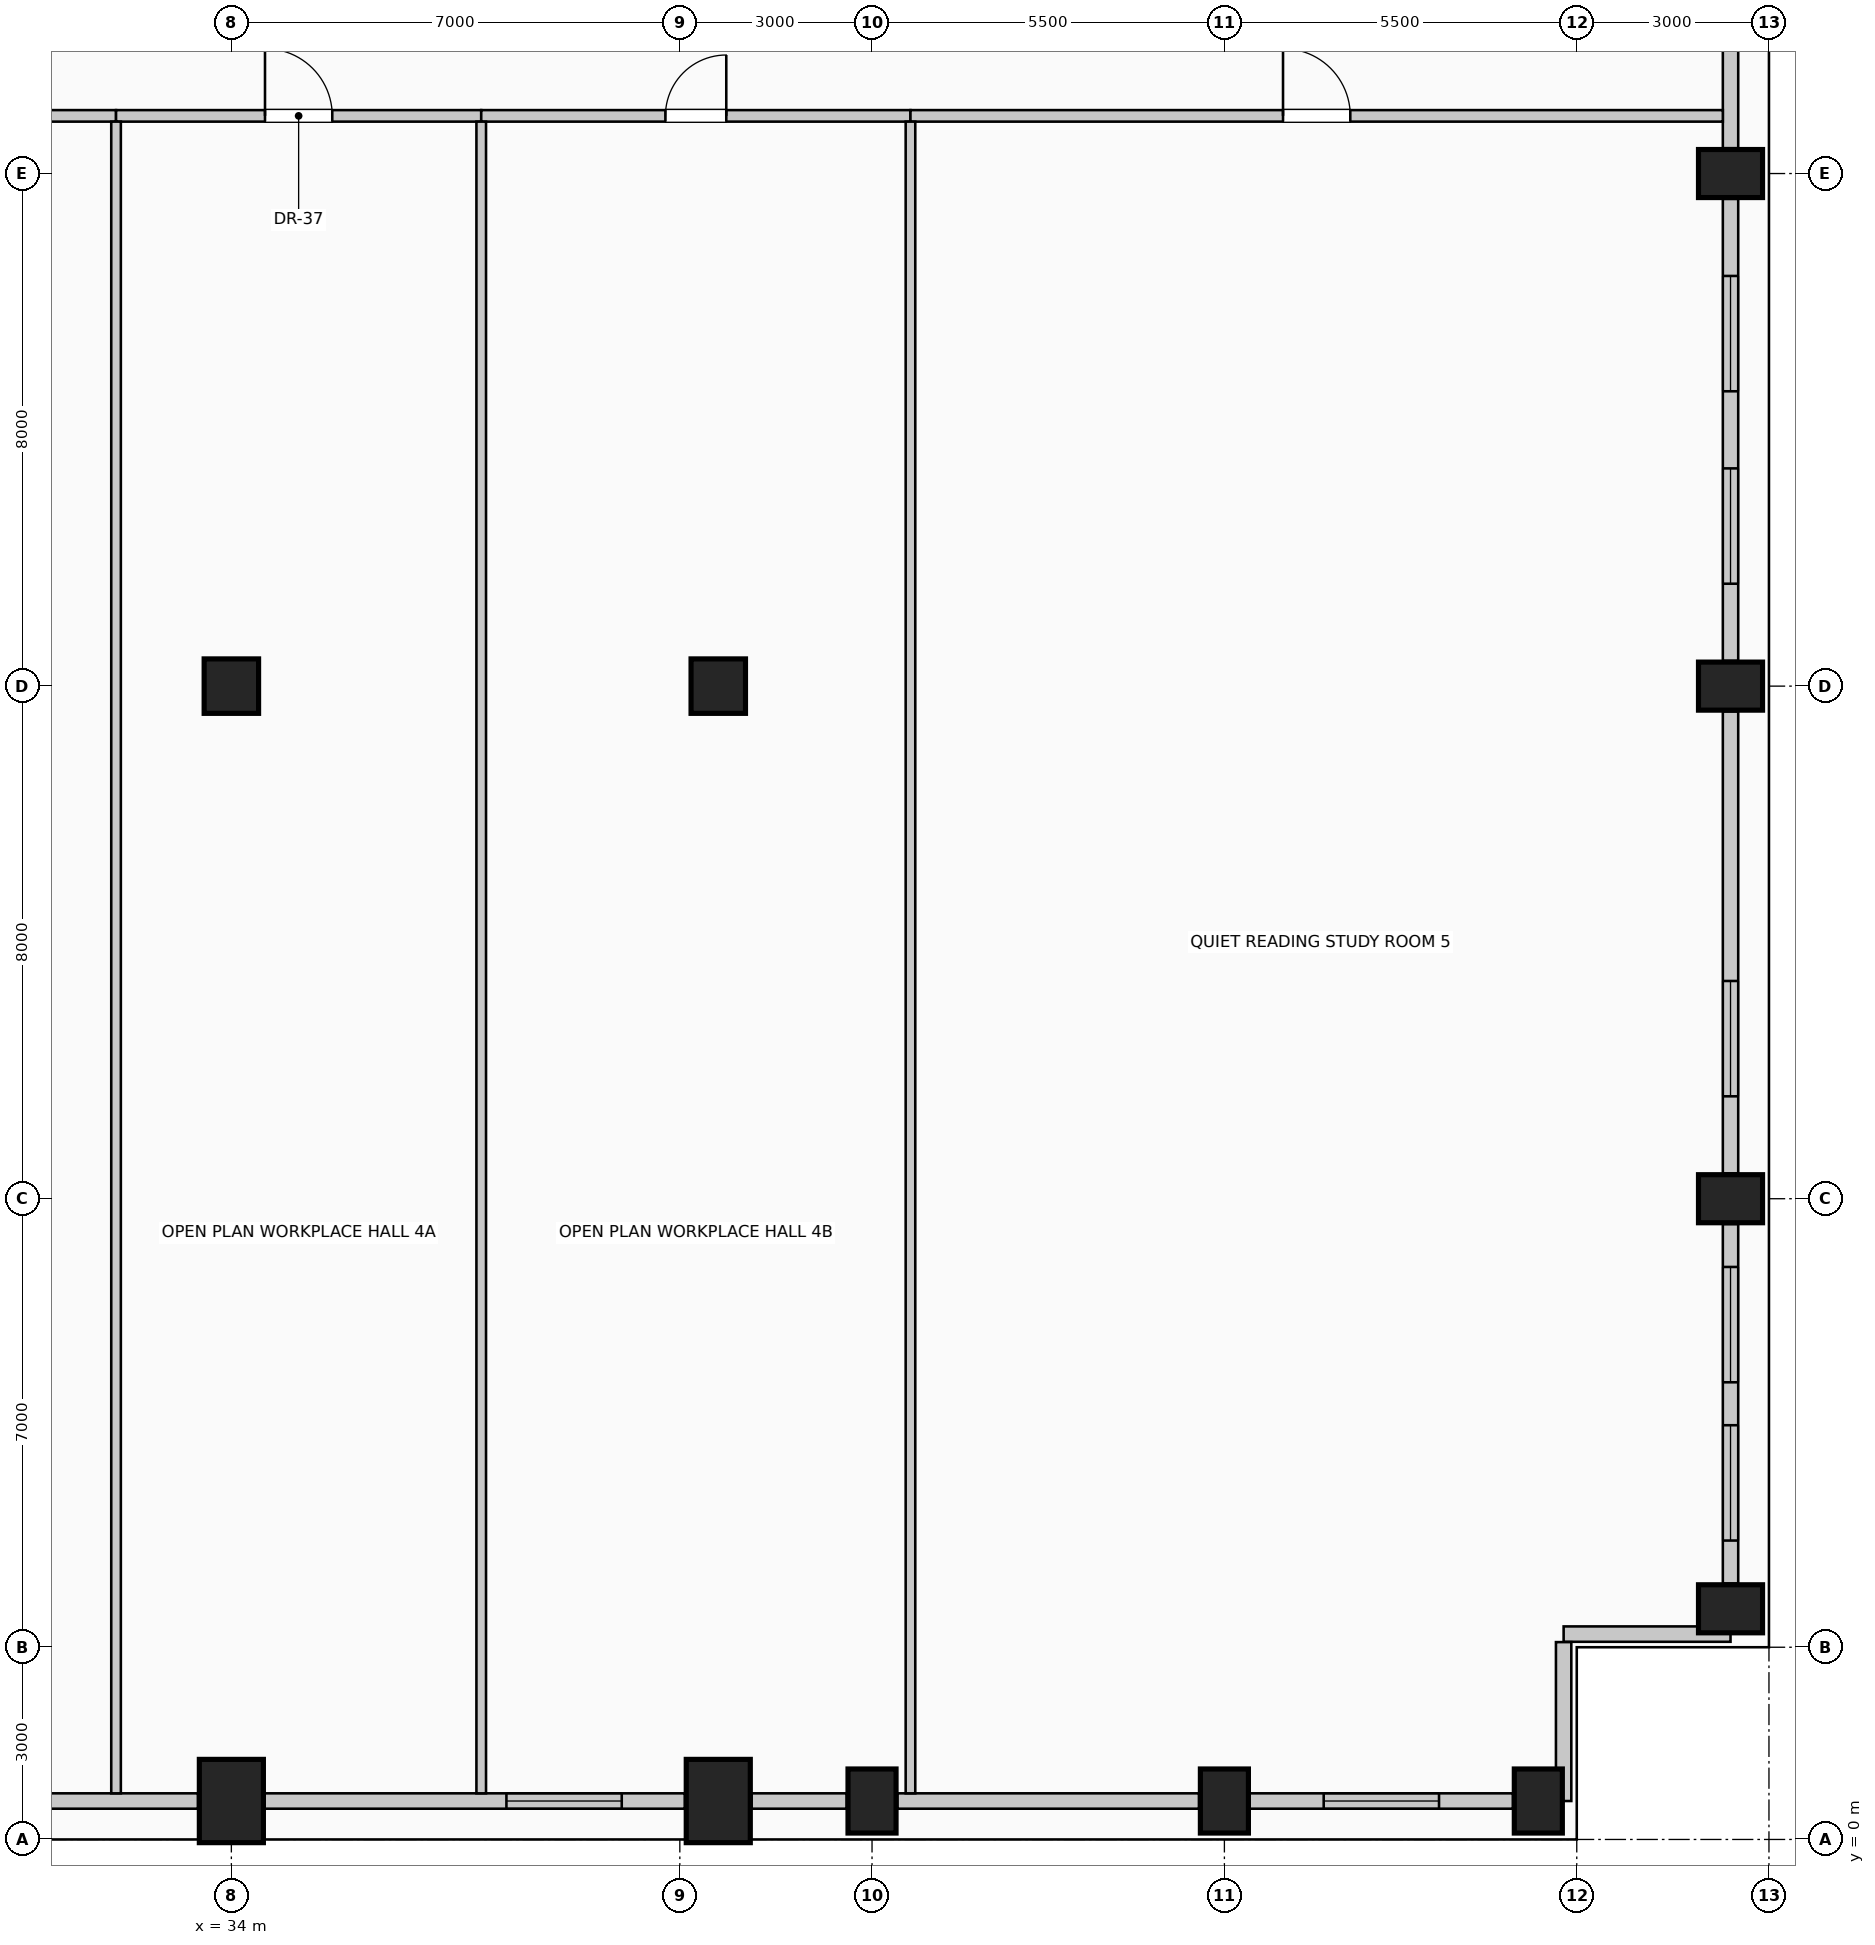
"""IFC4 building model, lengths in metres.
Left out: names, types, materials, properties, quantities, classifications, styles, units other than length and angle.
Written with IfcOpenShell. Run it as: python <this file> out.ifc"""

import sys

from ifc_helpers import new_model, si_unit, direction, frame, frame_2d, origin, origin_2d, place, context, subcontext, project, spatial, rectangle, circle, extrude, element, fill, save


model = new_model("IFC4")
c1 = context("Model", 3, precision=1e-05, world=origin(), true_north=direction((0.0, 1.0)))
c2 = subcontext(c1, "Body", "Model", "MODEL_VIEW")
j1 = project(units=[si_unit("LENGTHUNIT", "METRE"), si_unit("PLANEANGLEUNIT", "RADIAN")], contexts=[c1])
p1 = place(None, origin())
s1 = spatial("IfcSite", under=j1, at=p1, CompositionType="ELEMENT")
p2 = place(p1, origin())
s2 = spatial("IfcBuilding", under=s1, at=p2, CompositionType="ELEMENT")
p3 = place(p2, frame((0.0, 0.0, 222.6)))
s3 = spatial("IfcBuildingStorey", under=s2, at=p3, CompositionType="ELEMENT", Elevation=222.6)
for number, where, z_axis, x_axis in (
    (1, (34.0, 0.6, 0.0), (0.0, 0.0, 1.0), (1.0, 0.0, 0.0)),
    (2, (41.6, 0.6, 0.0), (0.0, 0.0, 1.0), (1.0, 0.0, 0.0)),
):
    element("IfcColumn", number, at=place(p3, frame(where, z_axis=z_axis, x_axis=x_axis)), inside=s3, PredefinedType="COLUMN", context=c2, shape_type="SweptSolid", body=[
        extrude(rectangle(XDim=1.0, YDim=1.3, at=origin_2d()), origin(), (0.0, 0.0, 1.0), 4.0),
    ])
for number, where, z_axis, x_axis in (
    (3, (44.0, 0.6, 0.0), (0.0, 0.0, 1.0), (1.0, 0.0, 0.0)),
    (4, (49.5, 0.6, 0.0), (0.0, 0.0, 1.0), (1.0, 0.0, 0.0)),
    (5, (54.4, 0.6, 0.0), (0.0, 0.0, 1.0), (1.0, 0.0, 0.0)),
    (6, (57.4, 3.6, 0.0), (0.0, 0.0, 1.0), (0.0, 1.0, 0.0)),
    (7, (57.4, 10.0, 0.0), (0.0, 0.0, 1.0), (0.0, 1.0, 0.0)),
    (8, (57.4, 18.0, 0.0), (0.0, 0.0, 1.0), (0.0, 1.0, 0.0)),
    (9, (57.4, 26.0, 0.0), (0.0, 0.0, 1.0), (0.0, 1.0, 0.0)),
):
    element("IfcColumn", number, at=place(p3, frame(where, z_axis=z_axis, x_axis=x_axis)), inside=s3, PredefinedType="COLUMN", context=c2, shape_type="SweptSolid", body=[
        extrude(rectangle(XDim=0.75, YDim=1.0, at=origin_2d()), origin(), (0.0, 0.0, 1.0), 4.0),
    ])
for number, where, z_axis, x_axis in (
    (10, (41.6, 18.0, 0.0), (0.0, 0.0, 1.0), (1.0, 0.0, 0.0)),
    (11, (34.0, 18.0, 0.0), (0.0, 0.0, 1.0), (1.0, 0.0, 0.0)),
):
    element("IfcColumn", number, at=place(p3, frame(where, z_axis=z_axis, x_axis=x_axis)), inside=s3, PredefinedType="COLUMN", context=c2, shape_type="SweptSolid", body=[
        extrude(circle(Radius=0.425, at=origin_2d()), origin(), (0.0, 0.0, 1.0), 4.0),
    ])
p4 = place(p3, frame((33.48, 0.6, 0.0), z_axis=(0.0, 0.0, 1.0), x_axis=(-1.0, 0.0, 0.0)))
e12 = element("IfcWall", 12, at=p4, inside=s3, PredefinedType="SOLIDWALL", context=c2, shape_type="SweptSolid", body=[
    extrude(rectangle(XDim=4.085, YDim=0.24, at=frame_2d((2.042, 0.0))), origin(), (0.0, 0.0, 1.0), 3.0),
])
p5 = place(p3, frame((41.08, 0.6, 0.0), z_axis=(0.0, 0.0, 1.0), x_axis=(-1.0, 0.0, 0.0)))
e13 = element("IfcWall", 13, at=p5, inside=s3, PredefinedType="SOLIDWALL", context=c2, shape_type="SweptSolid", body=[
    extrude(rectangle(XDim=6.56, YDim=0.24, at=frame_2d((3.28, 0.0))), origin(), (0.0, 0.0, 1.0), 3.0),
])
p6 = place(p5, frame((0.987, 0.0, 0.42)))
e14 = element("IfcOpeningElement", 14, at=p6, cuts=e13, PredefinedType="OPENING", context=c2, shape_type="SweptSolid", body=[
    extrude(rectangle(XDim=1.8, YDim=2.2, at=frame_2d((0.9, 1.1))), frame((0.0, 0.13, 0.0), z_axis=(0.0, -1.0, 0.0), x_axis=(1.0, 0.0, 0.0)), (0.0, 0.0, 1.0), 0.26),
])
p7 = place(p3, frame((43.605, 0.6, 0.0), z_axis=(0.0, 0.0, 1.0), x_axis=(-1.0, 0.0, 0.0)))
e15 = element("IfcWall", 15, at=p7, inside=s3, PredefinedType="SOLIDWALL", context=c2, shape_type="SweptSolid", body=[
    extrude(rectangle(XDim=1.485, YDim=0.24, at=frame_2d((0.742, 0.0))), origin(), (0.0, 0.0, 1.0), 3.0),
])
p8 = place(p3, frame((49.105, 0.6, 0.0), z_axis=(0.0, 0.0, 1.0), x_axis=(-1.0, 0.0, 0.0)))
e16 = element("IfcWall", 16, at=p8, inside=s3, PredefinedType="SOLIDWALL", context=c2, shape_type="SweptSolid", body=[
    extrude(rectangle(XDim=4.71, YDim=0.24, at=frame_2d((2.355, 0.0))), origin(), (0.0, 0.0, 1.0), 3.0),
])
p9 = place(p3, frame((54.005, 0.6, 0.0), z_axis=(0.0, 0.0, 1.0), x_axis=(-1.0, 0.0, 0.0)))
e17 = element("IfcWall", 17, at=p9, inside=s3, PredefinedType="SOLIDWALL", context=c2, shape_type="SweptSolid", body=[
    extrude(rectangle(XDim=4.11, YDim=0.24, at=frame_2d((2.055, 0.0))), origin(), (0.0, 0.0, 1.0), 3.0),
])
p10 = place(p9, frame((1.155, 0.0, 0.42)))
e18 = element("IfcOpeningElement", 18, at=p10, cuts=e17, PredefinedType="OPENING", context=c2, shape_type="SweptSolid", body=[
    extrude(rectangle(XDim=1.8, YDim=2.2, at=frame_2d((0.9, 1.1))), frame((0.0, 0.13, 0.0), z_axis=(0.0, -1.0, 0.0), x_axis=(1.0, 0.0, 0.0)), (0.0, 0.0, 1.0), 0.26),
])
p11 = place(p3, frame((57.4, 9.605, 0.0), z_axis=(0.0, 0.0, 1.0), x_axis=(0.0, -1.0, 0.0)))
e19 = element("IfcWall", 19, at=p11, inside=s3, PredefinedType="SOLIDWALL", context=c2, shape_type="SweptSolid", body=[
    extrude(rectangle(XDim=5.61, YDim=0.24, at=frame_2d((2.805, 0.0))), origin(), (0.0, 0.0, 1.0), 3.0),
])
p12 = place(p11, frame((0.67, 0.0, 0.42)))
e20 = element("IfcOpeningElement", 20, at=p12, cuts=e19, PredefinedType="OPENING", context=c2, shape_type="SweptSolid", body=[
    extrude(rectangle(XDim=1.8, YDim=2.2, at=frame_2d((0.9, 1.1))), frame((0.0, 0.13, 0.0), z_axis=(0.0, -1.0, 0.0), x_axis=(1.0, 0.0, 0.0)), (0.0, 0.0, 1.0), 0.26),
])
p13 = place(p11, frame((3.14, 0.0, 0.42)))
e21 = element("IfcOpeningElement", 21, at=p13, cuts=e19, PredefinedType="OPENING", context=c2, shape_type="SweptSolid", body=[
    extrude(rectangle(XDim=1.8, YDim=2.2, at=frame_2d((0.9, 1.1))), frame((0.0, 0.13, 0.0), z_axis=(0.0, -1.0, 0.0), x_axis=(1.0, 0.0, 0.0)), (0.0, 0.0, 1.0), 0.26),
])
p14 = place(p3, frame((57.4, 17.605, 0.0), z_axis=(0.0, 0.0, 1.0), x_axis=(0.0, -1.0, 0.0)))
e22 = element("IfcWall", 22, at=p14, inside=s3, PredefinedType="SOLIDWALL", context=c2, shape_type="SweptSolid", body=[
    extrude(rectangle(XDim=7.21, YDim=0.24, at=frame_2d((3.605, 0.0))), origin(), (0.0, 0.0, 1.0), 3.0),
])
p15 = place(p14, frame((4.207, 0.0, 0.42)))
e23 = element("IfcOpeningElement", 23, at=p15, cuts=e22, PredefinedType="OPENING", context=c2, shape_type="SweptSolid", body=[
    extrude(rectangle(XDim=1.8, YDim=2.2, at=frame_2d((0.9, 1.1))), frame((0.0, 0.13, 0.0), z_axis=(0.0, -1.0, 0.0), x_axis=(1.0, 0.0, 0.0)), (0.0, 0.0, 1.0), 0.26),
])
p16 = place(p3, frame((57.4, 25.605, 0.0), z_axis=(0.0, 0.0, 1.0), x_axis=(0.0, -1.0, 0.0)))
e24 = element("IfcWall", 24, at=p16, inside=s3, PredefinedType="SOLIDWALL", context=c2, shape_type="SweptSolid", body=[
    extrude(rectangle(XDim=7.21, YDim=0.24, at=frame_2d((3.605, 0.0))), origin(), (0.0, 0.0, 1.0), 3.0),
])
p17 = place(p16, frame((1.203, 0.0, 0.42)))
e25 = element("IfcOpeningElement", 25, at=p17, cuts=e24, PredefinedType="OPENING", context=c2, shape_type="SweptSolid", body=[
    extrude(rectangle(XDim=1.8, YDim=2.2, at=frame_2d((0.9, 1.1))), frame((0.0, 0.13, 0.0), z_axis=(0.0, -1.0, 0.0), x_axis=(1.0, 0.0, 0.0)), (0.0, 0.0, 1.0), 0.26),
])
p18 = place(p16, frame((4.207, 0.0, 0.42)))
e26 = element("IfcOpeningElement", 26, at=p18, cuts=e24, PredefinedType="OPENING", context=c2, shape_type="SweptSolid", body=[
    extrude(rectangle(XDim=1.8, YDim=2.2, at=frame_2d((0.9, 1.1))), frame((0.0, 0.13, 0.0), z_axis=(0.0, -1.0, 0.0), x_axis=(1.0, 0.0, 0.0)), (0.0, 0.0, 1.0), 0.26),
])
p19 = place(p3, frame((57.4, 33.605, 0.0), z_axis=(0.0, 0.0, 1.0), x_axis=(0.0, -1.0, 0.0)))
e27 = element("IfcWall", 27, at=p19, inside=s3, PredefinedType="SOLIDWALL", context=c2, shape_type="SweptSolid", body=[
    extrude(rectangle(XDim=7.21, YDim=0.24, at=frame_2d((3.605, 0.0))), origin(), (0.0, 0.0, 1.0), 3.0),
])
p20 = place(p3, frame((57.4, 3.205, 0.0), z_axis=(0.0, 0.0, 1.0), x_axis=(-1.0, 0.0, 0.0)))
e28 = element("IfcWall", 28, at=p20, inside=s3, PredefinedType="SOLIDWALL", context=c2, shape_type="SweptSolid", body=[
    extrude(rectangle(XDim=2.605, YDim=0.24, at=frame_2d((1.302, 0.0))), origin(), (0.0, 0.0, 1.0), 3.75),
])
p21 = place(p3, frame((54.795, 3.08, 0.0), z_axis=(0.0, 0.0, 1.0), x_axis=(0.0, -1.0, 0.0)))
e29 = element("IfcWall", 29, at=p21, inside=s3, PredefinedType="SOLIDWALL", context=c2, shape_type="SweptSolid", body=[
    extrude(rectangle(XDim=2.48, YDim=0.24, at=frame_2d((1.24, 0.0))), origin(), (0.0, 0.0, 1.0), 3.75),
])
p22 = place(p3, frame((23.1, 26.9, 0.0), z_axis=(0.0, 0.0, 1.0), x_axis=(1.0, 0.0, 0.0)))
e30 = element("IfcWall", 30, at=p22, inside=s3, PredefinedType="PARTITIONING", context=c2, shape_type="SweptSolid", body=[
    extrude(rectangle(XDim=9.1, YDim=0.18, at=frame_2d((4.55, 0.0))), origin(), (0.0, 0.0, 1.0), 3.75),
])
p23 = place(p22, frame((4.075, 0.0, 0.0)))
e31 = element("IfcOpeningElement", 31, at=p23, cuts=e30, PredefinedType="OPENING", context=c2, shape_type="SweptSolid", body=[
    extrude(rectangle(XDim=0.95, YDim=2.15, at=frame_2d((0.475, 1.075))), frame((0.0, 0.1, 0.0), z_axis=(0.0, -1.0, 0.0), x_axis=(1.0, 0.0, 0.0)), (0.0, 0.0, 1.0), 0.2),
])
p24 = place(p3, frame((32.2, 26.9, 0.0), z_axis=(0.0, 0.0, 1.0), x_axis=(1.0, 0.0, 0.0)))
e32 = element("IfcWall", 32, at=p24, inside=s3, PredefinedType="PARTITIONING", context=c2, shape_type="SweptSolid", body=[
    extrude(rectangle(XDim=5.7, YDim=0.18, at=frame_2d((2.85, 0.0))), origin(), (0.0, 0.0, 1.0), 3.75),
])
p25 = place(p24, frame((2.325, 0.0, 0.0)))
e33 = element("IfcOpeningElement", 33, at=p25, cuts=e32, PredefinedType="OPENING", context=c2, shape_type="SweptSolid", body=[
    extrude(rectangle(XDim=1.05, YDim=2.15, at=frame_2d((0.525, 1.075))), frame((0.0, 0.1, 0.0), z_axis=(0.0, -1.0, 0.0), x_axis=(1.0, 0.0, 0.0)), (0.0, 0.0, 1.0), 0.2),
])
p26 = place(p3, frame((37.9, 26.9, 0.0), z_axis=(0.0, 0.0, 1.0), x_axis=(1.0, 0.0, 0.0)))
e34 = element("IfcWall", 34, at=p26, inside=s3, PredefinedType="PARTITIONING", context=c2, shape_type="SweptSolid", body=[
    extrude(rectangle(XDim=6.7, YDim=0.18, at=frame_2d((3.35, 0.0))), origin(), (0.0, 0.0, 1.0), 3.75),
])
p27 = place(p26, frame((2.875, 0.0, 0.0)))
e35 = element("IfcOpeningElement", 35, at=p27, cuts=e34, PredefinedType="OPENING", context=c2, shape_type="SweptSolid", body=[
    extrude(rectangle(XDim=0.95, YDim=2.15, at=frame_2d((0.475, 1.075))), frame((0.0, 0.1, 0.0), z_axis=(0.0, -1.0, 0.0), x_axis=(1.0, 0.0, 0.0)), (0.0, 0.0, 1.0), 0.2),
])
p28 = place(p3, frame((44.6, 26.9, 0.0), z_axis=(0.0, 0.0, 1.0), x_axis=(1.0, 0.0, 0.0)))
e36 = element("IfcWall", 36, at=p28, inside=s3, PredefinedType="PARTITIONING", context=c2, shape_type="SweptSolid", body=[
    extrude(rectangle(XDim=12.68, YDim=0.18, at=frame_2d((6.34, 0.0))), origin(), (0.0, 0.0, 1.0), 3.75),
])
p29 = place(p28, frame((5.815, 0.0, 0.0)))
e37 = element("IfcOpeningElement", 37, at=p29, cuts=e36, PredefinedType="OPENING", context=c2, shape_type="SweptSolid", body=[
    extrude(rectangle(XDim=1.05, YDim=2.15, at=frame_2d((0.525, 1.075))), frame((0.0, 0.1, 0.0), z_axis=(0.0, -1.0, 0.0), x_axis=(1.0, 0.0, 0.0)), (0.0, 0.0, 1.0), 0.2),
])
for number, where, z_axis, x_axis in (
    (38, (32.2, 0.72, 0.0), (0.0, 0.0, 1.0), (0.0, 1.0, 0.0)),
    (39, (37.9, 0.72, 0.0), (0.0, 0.0, 1.0), (0.0, 1.0, 0.0)),
    (40, (44.6, 0.72, 0.0), (0.0, 0.0, 1.0), (0.0, 1.0, 0.0)),
):
    element("IfcWall", number, at=place(p3, frame(where, z_axis=z_axis, x_axis=x_axis)), inside=s3, PredefinedType="PARTITIONING", context=c2, shape_type="SweptSolid", body=[
        extrude(rectangle(XDim=26.09, YDim=0.15, at=frame_2d((13.045, 0.0))), origin(), (0.0, 0.0, 1.0), 3.75),
    ])
p30 = place(p6, origin())
e41 = element("IfcWindow", 41, at=p30, inside=s3, PartitioningType="SINGLE_PANEL", PredefinedType="WINDOW", context=c2, shape_type="SweptSolid", body=[
    extrude(rectangle(XDim=1.8, YDim=2.2, at=frame_2d((0.9, 1.1))), frame((0.0, 0.03, 0.0), z_axis=(0.0, -1.0, 0.0), x_axis=(1.0, 0.0, 0.0)), (0.0, 0.0, 1.0), 0.06),
])
fill(e14, e41)
p31 = place(p10, origin())
e42 = element("IfcWindow", 42, at=p31, inside=s3, PartitioningType="SINGLE_PANEL", PredefinedType="WINDOW", context=c2, shape_type="SweptSolid", body=[
    extrude(rectangle(XDim=1.8, YDim=2.2, at=frame_2d((0.9, 1.1))), frame((0.0, 0.03, 0.0), z_axis=(0.0, -1.0, 0.0), x_axis=(1.0, 0.0, 0.0)), (0.0, 0.0, 1.0), 0.06),
])
fill(e18, e42)
p32 = place(p12, origin())
e43 = element("IfcWindow", 43, at=p32, inside=s3, PartitioningType="SINGLE_PANEL", PredefinedType="WINDOW", context=c2, shape_type="SweptSolid", body=[
    extrude(rectangle(XDim=1.8, YDim=2.2, at=frame_2d((0.9, 1.1))), frame((0.0, 0.03, 0.0), z_axis=(0.0, -1.0, 0.0), x_axis=(1.0, 0.0, 0.0)), (0.0, 0.0, 1.0), 0.06),
])
fill(e20, e43)
p33 = place(p13, origin())
e44 = element("IfcWindow", 44, at=p33, inside=s3, PartitioningType="SINGLE_PANEL", PredefinedType="WINDOW", context=c2, shape_type="SweptSolid", body=[
    extrude(rectangle(XDim=1.8, YDim=2.2, at=frame_2d((0.9, 1.1))), frame((0.0, 0.03, 0.0), z_axis=(0.0, -1.0, 0.0), x_axis=(1.0, 0.0, 0.0)), (0.0, 0.0, 1.0), 0.06),
])
fill(e21, e44)
p34 = place(p15, origin())
e45 = element("IfcWindow", 45, at=p34, inside=s3, PartitioningType="SINGLE_PANEL", PredefinedType="WINDOW", context=c2, shape_type="SweptSolid", body=[
    extrude(rectangle(XDim=1.8, YDim=2.2, at=frame_2d((0.9, 1.1))), frame((0.0, 0.03, 0.0), z_axis=(0.0, -1.0, 0.0), x_axis=(1.0, 0.0, 0.0)), (0.0, 0.0, 1.0), 0.06),
])
fill(e23, e45)
p35 = place(p17, origin())
e46 = element("IfcWindow", 46, at=p35, inside=s3, PartitioningType="SINGLE_PANEL", PredefinedType="WINDOW", context=c2, shape_type="SweptSolid", body=[
    extrude(rectangle(XDim=1.8, YDim=2.2, at=frame_2d((0.9, 1.1))), frame((0.0, 0.03, 0.0), z_axis=(0.0, -1.0, 0.0), x_axis=(1.0, 0.0, 0.0)), (0.0, 0.0, 1.0), 0.06),
])
fill(e25, e46)
p36 = place(p18, origin())
e47 = element("IfcWindow", 47, at=p36, inside=s3, PartitioningType="SINGLE_PANEL", PredefinedType="WINDOW", context=c2, shape_type="SweptSolid", body=[
    extrude(rectangle(XDim=1.8, YDim=2.2, at=frame_2d((0.9, 1.1))), frame((0.0, 0.03, 0.0), z_axis=(0.0, -1.0, 0.0), x_axis=(1.0, 0.0, 0.0)), (0.0, 0.0, 1.0), 0.06),
])
fill(e26, e47)
p37 = place(p25, origin())
e48 = element("IfcDoor", 48, at=p37, inside=s3, OperationType="SINGLE_SWING_LEFT", PredefinedType="DOOR", context=c2, shape_type="SweptSolid", body=[
    extrude(rectangle(XDim=1.05, YDim=2.15, at=frame_2d((0.525, 1.075))), frame((0.0, 0.025, 0.0), z_axis=(0.0, -1.0, 0.0), x_axis=(1.0, 0.0, 0.0)), (0.0, 0.0, 1.0), 0.05),
])
fill(e33, e48)
p38 = place(p27, origin())
e49 = element("IfcDoor", 49, at=p38, inside=s3, OperationType="SINGLE_SWING_RIGHT", PredefinedType="DOOR", context=c2, shape_type="SweptSolid", body=[
    extrude(rectangle(XDim=0.95, YDim=2.15, at=frame_2d((0.475, 1.075))), frame((0.0, 0.025, 0.0), z_axis=(0.0, -1.0, 0.0), x_axis=(1.0, 0.0, 0.0)), (0.0, 0.0, 1.0), 0.05),
])
fill(e35, e49)
p39 = place(p29, origin())
e50 = element("IfcDoor", 50, at=p39, inside=s3, OperationType="SINGLE_SWING_LEFT", PredefinedType="DOOR", context=c2, shape_type="SweptSolid", body=[
    extrude(rectangle(XDim=1.05, YDim=2.15, at=frame_2d((0.525, 1.075))), frame((0.0, 0.025, 0.0), z_axis=(0.0, -1.0, 0.0), x_axis=(1.0, 0.0, 0.0)), (0.0, 0.0, 1.0), 0.05),
])
fill(e37, e50)
save(model, sys.argv[1])
